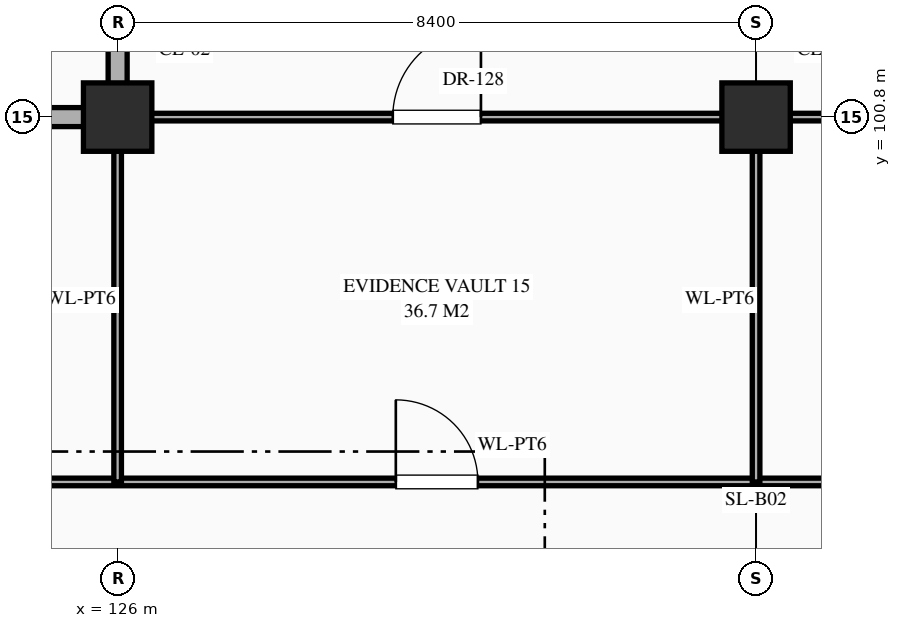
"""IFC4 building model, lengths in metres.
Left out: names, types, materials, properties, quantities, classifications, styles, units other than length and angle.
Written with IfcOpenShell. Run it as: python <this file> out.ifc"""

import sys

from ifc_helpers import new_model, si_unit, direction, frame, frame_2d, origin, origin_2d, place, context, subcontext, project, spatial, rectangle, extrude, element, fill, save


model = new_model("IFC4")
c1 = context("Model", 3, precision=1e-05, world=origin(), true_north=direction((0.0, 1.0)))
c2 = subcontext(c1, "Body", "Model", "MODEL_VIEW")
j1 = project(units=[si_unit("LENGTHUNIT", "METRE"), si_unit("PLANEANGLEUNIT", "RADIAN")], contexts=[c1])
p1 = place(None, origin())
s1 = spatial("IfcSite", under=j1, at=p1, CompositionType="ELEMENT")
p2 = place(p1, origin())
s2 = spatial("IfcBuilding", under=s1, at=p2, CompositionType="ELEMENT")
p3 = place(p2, frame((0.0, 0.0, -10.2)))
s3 = spatial("IfcBuildingStorey", under=s2, at=p3, CompositionType="ELEMENT", Elevation=-10.2)
for number, where, z_axis, x_axis in (
    (1, (126.0, 100.8, 0.0), (0.0, 0.0, 1.0), (1.0, 0.0, 0.0)),
    (2, (134.4, 100.8, 0.0), (0.0, 0.0, 1.0), (1.0, 0.0, 0.0)),
):
    element("IfcColumn", number, at=place(p3, frame(where, z_axis=z_axis, x_axis=x_axis)), inside=s3, PredefinedType="COLUMN", context=c2, shape_type="SweptSolid", body=[
        extrude(rectangle(XDim=0.9, YDim=0.9, at=origin_2d()), origin(), (0.0, 0.0, 1.0), 4.8),
    ])
p4 = place(p3, frame((0.04, 96.0, 0.0), z_axis=(0.0, 0.0, 1.0), x_axis=(1.0, 0.0, 0.0)))
e3 = element("IfcWall", 3, at=p4, inside=s3, PredefinedType="STANDARD", context=c2, shape_type="SweptSolid", body=[
    extrude(rectangle(XDim=151.16, YDim=0.1, at=frame_2d((75.58, 0.0))), origin(), (0.0, 0.0, 1.0), 4.48),
])
p5 = place(p4, frame((1.04, 0.0, 0.0)))
e4 = element("IfcOpeningElement", 4, at=p5, cuts=e3, PredefinedType="OPENING", context=c2, shape_type="SweptSolid", body=[
    extrude(rectangle(XDim=1.28, YDim=2.35, at=frame_2d((0.64, 1.175))), frame((0.0, 0.062, 0.0), z_axis=(0.0, -1.0, 0.0), x_axis=(1.0, 0.0, 0.0)), (0.0, 0.0, 1.0), 0.124),
])
p6 = place(p4, frame((4.09, 0.0, 0.0)))
e5 = element("IfcOpeningElement", 5, at=p6, cuts=e3, PredefinedType="OPENING", context=c2, shape_type="SweptSolid", body=[
    extrude(rectangle(XDim=0.94, YDim=2.3, at=frame_2d((0.47, 1.15))), frame((0.0, 0.062, 0.0), z_axis=(0.0, -1.0, 0.0), x_axis=(1.0, 0.0, 0.0)), (0.0, 0.0, 1.0), 0.124),
])
p7 = place(p4, frame((6.57, 0.0, 0.0)))
e6 = element("IfcOpeningElement", 6, at=p7, cuts=e3, PredefinedType="OPENING", context=c2, shape_type="SweptSolid", body=[
    extrude(rectangle(XDim=0.98, YDim=2.35, at=frame_2d((0.49, 1.175))), frame((0.0, 0.062, 0.0), z_axis=(0.0, -1.0, 0.0), x_axis=(1.0, 0.0, 0.0)), (0.0, 0.0, 1.0), 0.124),
])
p8 = place(p4, frame((12.05, 0.0, 0.0)))
e7 = element("IfcOpeningElement", 7, at=p8, cuts=e3, PredefinedType="OPENING", context=c2, shape_type="SweptSolid", body=[
    extrude(rectangle(XDim=1.02, YDim=2.4, at=frame_2d((0.51, 1.2))), frame((0.0, 0.062, 0.0), z_axis=(0.0, -1.0, 0.0), x_axis=(1.0, 0.0, 0.0)), (0.0, 0.0, 1.0), 0.124),
])
p9 = place(p4, frame((20.43, 0.0, 0.0)))
e8 = element("IfcOpeningElement", 8, at=p9, cuts=e3, PredefinedType="OPENING", context=c2, shape_type="SweptSolid", body=[
    extrude(rectangle(XDim=1.06, YDim=2.4, at=frame_2d((0.53, 1.2))), frame((0.0, 0.062, 0.0), z_axis=(0.0, -1.0, 0.0), x_axis=(1.0, 0.0, 0.0)), (0.0, 0.0, 1.0), 0.124),
])
p10 = place(p4, frame((26.29, 0.0, 0.0)))
e9 = element("IfcOpeningElement", 9, at=p10, cuts=e3, PredefinedType="OPENING", context=c2, shape_type="SweptSolid", body=[
    extrude(rectangle(XDim=1.14, YDim=2.4, at=frame_2d((0.57, 1.2))), frame((0.0, 0.062, 0.0), z_axis=(0.0, -1.0, 0.0), x_axis=(1.0, 0.0, 0.0)), (0.0, 0.0, 1.0), 0.124),
])
p11 = place(p4, frame((29.31, 0.0, 0.0)))
e10 = element("IfcOpeningElement", 10, at=p11, cuts=e3, PredefinedType="OPENING", context=c2, shape_type="SweptSolid", body=[
    extrude(rectangle(XDim=0.9, YDim=2.15, at=frame_2d((0.45, 1.075))), frame((0.0, 0.062, 0.0), z_axis=(0.0, -1.0, 0.0), x_axis=(1.0, 0.0, 0.0)), (0.0, 0.0, 1.0), 0.124),
])
p12 = place(p4, frame((31.83, 0.0, 0.0)))
e11 = element("IfcOpeningElement", 11, at=p12, cuts=e3, PredefinedType="OPENING", context=c2, shape_type="SweptSolid", body=[
    extrude(rectangle(XDim=0.86, YDim=2.1, at=frame_2d((0.43, 1.05))), frame((0.0, 0.062, 0.0), z_axis=(0.0, -1.0, 0.0), x_axis=(1.0, 0.0, 0.0)), (0.0, 0.0, 1.0), 0.124),
])
p13 = place(p4, frame((37.3, 0.0, 0.0)))
e12 = element("IfcOpeningElement", 12, at=p13, cuts=e3, PredefinedType="OPENING", context=c2, shape_type="SweptSolid", body=[
    extrude(rectangle(XDim=0.92, YDim=2.15, at=frame_2d((0.46, 1.075))), frame((0.0, 0.062, 0.0), z_axis=(0.0, -1.0, 0.0), x_axis=(1.0, 0.0, 0.0)), (0.0, 0.0, 1.0), 0.124),
])
p14 = place(p4, frame((45.68, 0.0, 0.0)))
e13 = element("IfcOpeningElement", 13, at=p14, cuts=e3, PredefinedType="OPENING", context=c2, shape_type="SweptSolid", body=[
    extrude(rectangle(XDim=0.96, YDim=2.2, at=frame_2d((0.48, 1.1))), frame((0.0, 0.062, 0.0), z_axis=(0.0, -1.0, 0.0), x_axis=(1.0, 0.0, 0.0)), (0.0, 0.0, 1.0), 0.124),
])
p15 = place(p4, frame((51.57, 0.0, 0.0)))
e14 = element("IfcOpeningElement", 14, at=p15, cuts=e3, PredefinedType="OPENING", context=c2, shape_type="SweptSolid", body=[
    extrude(rectangle(XDim=0.98, YDim=2.35, at=frame_2d((0.49, 1.175))), frame((0.0, 0.062, 0.0), z_axis=(0.0, -1.0, 0.0), x_axis=(1.0, 0.0, 0.0)), (0.0, 0.0, 1.0), 0.124),
])
p16 = place(p4, frame((54.45, 0.0, 0.0)))
e15 = element("IfcOpeningElement", 15, at=p16, cuts=e3, PredefinedType="OPENING", context=c2, shape_type="SweptSolid", body=[
    extrude(rectangle(XDim=1.02, YDim=2.4, at=frame_2d((0.51, 1.2))), frame((0.0, 0.062, 0.0), z_axis=(0.0, -1.0, 0.0), x_axis=(1.0, 0.0, 0.0)), (0.0, 0.0, 1.0), 0.124),
])
p17 = place(p4, frame((56.93, 0.0, 0.0)))
e16 = element("IfcOpeningElement", 16, at=p17, cuts=e3, PredefinedType="OPENING", context=c2, shape_type="SweptSolid", body=[
    extrude(rectangle(XDim=1.06, YDim=2.4, at=frame_2d((0.53, 1.2))), frame((0.0, 0.062, 0.0), z_axis=(0.0, -1.0, 0.0), x_axis=(1.0, 0.0, 0.0)), (0.0, 0.0, 1.0), 0.124),
])
p18 = place(p4, frame((62.39, 0.0, 0.0)))
e17 = element("IfcOpeningElement", 17, at=p18, cuts=e3, PredefinedType="OPENING", context=c2, shape_type="SweptSolid", body=[
    extrude(rectangle(XDim=1.14, YDim=2.4, at=frame_2d((0.57, 1.2))), frame((0.0, 0.062, 0.0), z_axis=(0.0, -1.0, 0.0), x_axis=(1.0, 0.0, 0.0)), (0.0, 0.0, 1.0), 0.124),
])
p19 = place(p4, frame((70.91, 0.0, 0.0)))
e18 = element("IfcOpeningElement", 18, at=p19, cuts=e3, PredefinedType="OPENING", context=c2, shape_type="SweptSolid", body=[
    extrude(rectangle(XDim=0.9, YDim=2.15, at=frame_2d((0.45, 1.075))), frame((0.0, 0.062, 0.0), z_axis=(0.0, -1.0, 0.0), x_axis=(1.0, 0.0, 0.0)), (0.0, 0.0, 1.0), 0.124),
])
p20 = place(p4, frame((79.33, 0.0, 0.0)))
e19 = element("IfcOpeningElement", 19, at=p20, cuts=e3, PredefinedType="OPENING", context=c2, shape_type="SweptSolid", body=[
    extrude(rectangle(XDim=0.86, YDim=2.1, at=frame_2d((0.43, 1.05))), frame((0.0, 0.062, 0.0), z_axis=(0.0, -1.0, 0.0), x_axis=(1.0, 0.0, 0.0)), (0.0, 0.0, 1.0), 0.124),
])
p21 = place(p4, frame((85.1, 0.0, 0.0)))
e20 = element("IfcOpeningElement", 20, at=p21, cuts=e3, PredefinedType="OPENING", context=c2, shape_type="SweptSolid", body=[
    extrude(rectangle(XDim=1.12, YDim=2.25, at=frame_2d((0.56, 1.125))), frame((0.0, 0.062, 0.0), z_axis=(0.0, -1.0, 0.0), x_axis=(1.0, 0.0, 0.0)), (0.0, 0.0, 1.0), 0.124),
])
p22 = place(p4, frame((87.98, 0.0, 0.0)))
e21 = element("IfcOpeningElement", 21, at=p22, cuts=e3, PredefinedType="OPENING", context=c2, shape_type="SweptSolid", body=[
    extrude(rectangle(XDim=1.16, YDim=2.3, at=frame_2d((0.58, 1.15))), frame((0.0, 0.062, 0.0), z_axis=(0.0, -1.0, 0.0), x_axis=(1.0, 0.0, 0.0)), (0.0, 0.0, 1.0), 0.124),
])
p23 = place(p4, frame((90.46, 0.0, 0.0)))
e22 = element("IfcOpeningElement", 22, at=p23, cuts=e3, PredefinedType="OPENING", context=c2, shape_type="SweptSolid", body=[
    extrude(rectangle(XDim=1.2, YDim=2.35, at=frame_2d((0.6, 1.175))), frame((0.0, 0.062, 0.0), z_axis=(0.0, -1.0, 0.0), x_axis=(1.0, 0.0, 0.0)), (0.0, 0.0, 1.0), 0.124),
])
p24 = place(p4, frame((95.94, 0.0, 0.0)))
e23 = element("IfcOpeningElement", 23, at=p24, cuts=e3, PredefinedType="OPENING", context=c2, shape_type="SweptSolid", body=[
    extrude(rectangle(XDim=1.24, YDim=2.3, at=frame_2d((0.62, 1.15))), frame((0.0, 0.062, 0.0), z_axis=(0.0, -1.0, 0.0), x_axis=(1.0, 0.0, 0.0)), (0.0, 0.0, 1.0), 0.124),
])
p25 = place(p4, frame((104.32, 0.0, 0.0)))
e24 = element("IfcOpeningElement", 24, at=p25, cuts=e3, PredefinedType="OPENING", context=c2, shape_type="SweptSolid", body=[
    extrude(rectangle(XDim=1.28, YDim=2.35, at=frame_2d((0.64, 1.175))), frame((0.0, 0.062, 0.0), z_axis=(0.0, -1.0, 0.0), x_axis=(1.0, 0.0, 0.0)), (0.0, 0.0, 1.0), 0.124),
])
p26 = place(p4, frame((110.39, 0.0, 0.0)))
e25 = element("IfcOpeningElement", 25, at=p26, cuts=e3, PredefinedType="OPENING", context=c2, shape_type="SweptSolid", body=[
    extrude(rectangle(XDim=0.94, YDim=2.3, at=frame_2d((0.47, 1.15))), frame((0.0, 0.062, 0.0), z_axis=(0.0, -1.0, 0.0), x_axis=(1.0, 0.0, 0.0)), (0.0, 0.0, 1.0), 0.124),
])
p27 = place(p4, frame((113.27, 0.0, 0.0)))
e26 = element("IfcOpeningElement", 26, at=p27, cuts=e3, PredefinedType="OPENING", context=c2, shape_type="SweptSolid", body=[
    extrude(rectangle(XDim=0.98, YDim=2.35, at=frame_2d((0.49, 1.175))), frame((0.0, 0.062, 0.0), z_axis=(0.0, -1.0, 0.0), x_axis=(1.0, 0.0, 0.0)), (0.0, 0.0, 1.0), 0.124),
])
p28 = place(p4, frame((115.75, 0.0, 0.0)))
e27 = element("IfcOpeningElement", 27, at=p28, cuts=e3, PredefinedType="OPENING", context=c2, shape_type="SweptSolid", body=[
    extrude(rectangle(XDim=1.02, YDim=2.4, at=frame_2d((0.51, 1.2))), frame((0.0, 0.062, 0.0), z_axis=(0.0, -1.0, 0.0), x_axis=(1.0, 0.0, 0.0)), (0.0, 0.0, 1.0), 0.124),
])
p29 = place(p4, frame((121.24, 0.0, 0.0)))
e28 = element("IfcOpeningElement", 28, at=p29, cuts=e3, PredefinedType="OPENING", context=c2, shape_type="SweptSolid", body=[
    extrude(rectangle(XDim=1.04, YDim=2.2, at=frame_2d((0.52, 1.1))), frame((0.0, 0.062, 0.0), z_axis=(0.0, -1.0, 0.0), x_axis=(1.0, 0.0, 0.0)), (0.0, 0.0, 1.0), 0.124),
])
p30 = place(p4, frame((129.62, 0.0, 0.0)))
e29 = element("IfcOpeningElement", 29, at=p30, cuts=e3, PredefinedType="OPENING", context=c2, shape_type="SweptSolid", body=[
    extrude(rectangle(XDim=1.08, YDim=2.25, at=frame_2d((0.54, 1.125))), frame((0.0, 0.062, 0.0), z_axis=(0.0, -1.0, 0.0), x_axis=(1.0, 0.0, 0.0)), (0.0, 0.0, 1.0), 0.124),
])
p31 = place(p4, frame((135.5, 0.0, 0.0)))
e30 = element("IfcOpeningElement", 30, at=p31, cuts=e3, PredefinedType="OPENING", context=c2, shape_type="SweptSolid", body=[
    extrude(rectangle(XDim=1.12, YDim=2.25, at=frame_2d((0.56, 1.125))), frame((0.0, 0.062, 0.0), z_axis=(0.0, -1.0, 0.0), x_axis=(1.0, 0.0, 0.0)), (0.0, 0.0, 1.0), 0.124),
])
p32 = place(p4, frame((138.38, 0.0, 0.0)))
e31 = element("IfcOpeningElement", 31, at=p32, cuts=e3, PredefinedType="OPENING", context=c2, shape_type="SweptSolid", body=[
    extrude(rectangle(XDim=1.16, YDim=2.3, at=frame_2d((0.58, 1.15))), frame((0.0, 0.062, 0.0), z_axis=(0.0, -1.0, 0.0), x_axis=(1.0, 0.0, 0.0)), (0.0, 0.0, 1.0), 0.124),
])
p33 = place(p4, frame((140.86, 0.0, 0.0)))
e32 = element("IfcOpeningElement", 32, at=p33, cuts=e3, PredefinedType="OPENING", context=c2, shape_type="SweptSolid", body=[
    extrude(rectangle(XDim=1.2, YDim=2.35, at=frame_2d((0.6, 1.175))), frame((0.0, 0.062, 0.0), z_axis=(0.0, -1.0, 0.0), x_axis=(1.0, 0.0, 0.0)), (0.0, 0.0, 1.0), 0.124),
])
p34 = place(p4, frame((146.34, 0.0, 0.0)))
e33 = element("IfcOpeningElement", 33, at=p34, cuts=e3, PredefinedType="OPENING", context=c2, shape_type="SweptSolid", body=[
    extrude(rectangle(XDim=1.24, YDim=2.3, at=frame_2d((0.62, 1.15))), frame((0.0, 0.062, 0.0), z_axis=(0.0, -1.0, 0.0), x_axis=(1.0, 0.0, 0.0)), (0.0, 0.0, 1.0), 0.124),
])
p35 = place(p3, frame((121.8, 100.8, 0.0), z_axis=(0.0, 0.0, 1.0), x_axis=(1.0, 0.0, 0.0)))
e34 = element("IfcWall", 34, at=p35, inside=s3, PredefinedType="STANDARD", context=c2, shape_type="SweptSolid", body=[
    extrude(rectangle(XDim=4.2, YDim=0.25, at=frame_2d((2.1, 0.0))), origin(), (0.0, 0.0, 1.0), 3.63),
])
p36 = place(p3, frame((126.0, 100.8, 0.0), z_axis=(0.0, 0.0, 1.0), x_axis=(1.0, 0.0, 0.0)))
e35 = element("IfcWall", 35, at=p36, inside=s3, PredefinedType="STANDARD", context=c2, shape_type="SweptSolid", body=[
    extrude(rectangle(XDim=25.2, YDim=0.1, at=frame_2d((12.6, 0.0))), origin(), (0.0, 0.0, 1.0), 3.63),
])
p37 = place(p36, frame((3.62, 0.0, 0.0)))
e36 = element("IfcOpeningElement", 36, at=p37, cuts=e35, PredefinedType="OPENING", context=c2, shape_type="SweptSolid", body=[
    extrude(rectangle(XDim=1.16, YDim=2.3, at=frame_2d((0.58, 1.15))), frame((0.0, 0.062, 0.0), z_axis=(0.0, -1.0, 0.0), x_axis=(1.0, 0.0, 0.0)), (0.0, 0.0, 1.0), 0.124),
])
p38 = place(p36, frame((9.685, 0.0, 0.0)))
e37 = element("IfcOpeningElement", 37, at=p38, cuts=e35, PredefinedType="OPENING", context=c2, shape_type="SweptSolid", body=[
    extrude(rectangle(XDim=1.2, YDim=2.35, at=frame_2d((0.6, 1.175))), frame((0.0, 0.062, 0.0), z_axis=(0.0, -1.0, 0.0), x_axis=(1.0, 0.0, 0.0)), (0.0, 0.0, 1.0), 0.124),
])
p39 = place(p36, frame((12.38, 0.0, 0.0)))
e38 = element("IfcOpeningElement", 38, at=p39, cuts=e35, PredefinedType="OPENING", context=c2, shape_type="SweptSolid", body=[
    extrude(rectangle(XDim=1.24, YDim=2.3, at=frame_2d((0.62, 1.15))), frame((0.0, 0.062, 0.0), z_axis=(0.0, -1.0, 0.0), x_axis=(1.0, 0.0, 0.0)), (0.0, 0.0, 1.0), 0.124),
])
p40 = place(p36, frame((14.675, 0.0, 0.0)))
e39 = element("IfcOpeningElement", 39, at=p40, cuts=e35, PredefinedType="OPENING", context=c2, shape_type="SweptSolid", body=[
    extrude(rectangle(XDim=1.28, YDim=2.35, at=frame_2d((0.64, 1.175))), frame((0.0, 0.062, 0.0), z_axis=(0.0, -1.0, 0.0), x_axis=(1.0, 0.0, 0.0)), (0.0, 0.0, 1.0), 0.124),
])
p41 = place(p36, frame((20.542, 0.0, 0.0)))
e40 = element("IfcOpeningElement", 40, at=p41, cuts=e35, PredefinedType="OPENING", context=c2, shape_type="SweptSolid", body=[
    extrude(rectangle(XDim=0.94, YDim=2.3, at=frame_2d((0.47, 1.15))), frame((0.0, 0.062, 0.0), z_axis=(0.0, -1.0, 0.0), x_axis=(1.0, 0.0, 0.0)), (0.0, 0.0, 1.0), 0.124),
])
p42 = place(p3, frame((126.0, 96.0, 0.0), z_axis=(0.0, 0.0, 1.0), x_axis=(0.0, 1.0, 0.0)))
e41 = element("IfcWall", 41, at=p42, inside=s3, PredefinedType="STANDARD", context=c2, shape_type="SweptSolid", body=[
    extrude(rectangle(XDim=4.8, YDim=0.1, at=frame_2d((2.4, 0.0))), origin(), (0.0, 0.0, 1.0), 3.73),
])
p43 = place(p3, frame((126.0, 100.8, 0.0), z_axis=(0.0, 0.0, 1.0), x_axis=(0.0, 1.0, 0.0)))
e42 = element("IfcWall", 42, at=p43, inside=s3, PredefinedType="STANDARD", context=c2, shape_type="SweptSolid", body=[
    extrude(rectangle(XDim=3.6, YDim=0.25, at=frame_2d((1.8, 0.0))), origin(), (0.0, 0.0, 1.0), 3.73),
])
p44 = place(p43, frame((0.885, 0.0, 0.0)))
e43 = element("IfcOpeningElement", 43, at=p44, cuts=e42, PredefinedType="OPENING", context=c2, shape_type="SweptSolid", body=[
    extrude(rectangle(XDim=1.0, YDim=2.2, at=frame_2d((0.5, 1.1))), frame((0.0, 0.137, 0.0), z_axis=(0.0, -1.0, 0.0), x_axis=(1.0, 0.0, 0.0)), (0.0, 0.0, 1.0), 0.274),
])
p45 = place(p3, frame((134.4, 96.0, 0.0), z_axis=(0.0, 0.0, 1.0), x_axis=(0.0, 1.0, 0.0)))
e44 = element("IfcWall", 44, at=p45, inside=s3, PredefinedType="STANDARD", context=c2, shape_type="SweptSolid", body=[
    extrude(rectangle(XDim=4.8, YDim=0.1, at=frame_2d((2.4, 0.0))), origin(), (0.0, 0.0, 1.0), 3.73),
])
p46 = place(p37, origin())
e45 = element("IfcDoor", 45, at=p46, inside=s3, OperationType="SINGLE_SWING_RIGHT", PredefinedType="DOOR", context=c2, shape_type="SweptSolid", body=[
    extrude(rectangle(XDim=1.16, YDim=2.3, at=frame_2d((0.58, 1.15))), frame((0.0, 0.025, 0.0), z_axis=(0.0, -1.0, 0.0), x_axis=(1.0, 0.0, 0.0)), (0.0, 0.0, 1.0), 0.05),
])
fill(e36, e45)
p47 = place(p30, origin())
e46 = element("IfcDoor", 46, at=p47, inside=s3, OperationType="SINGLE_SWING_LEFT", PredefinedType="DOOR", context=c2, shape_type="SweptSolid", body=[
    extrude(rectangle(XDim=1.08, YDim=2.25, at=frame_2d((0.54, 1.125))), frame((0.0, 0.025, 0.0), z_axis=(0.0, -1.0, 0.0), x_axis=(1.0, 0.0, 0.0)), (0.0, 0.0, 1.0), 0.05),
])
fill(e29, e46)
save(model, sys.argv[1])
